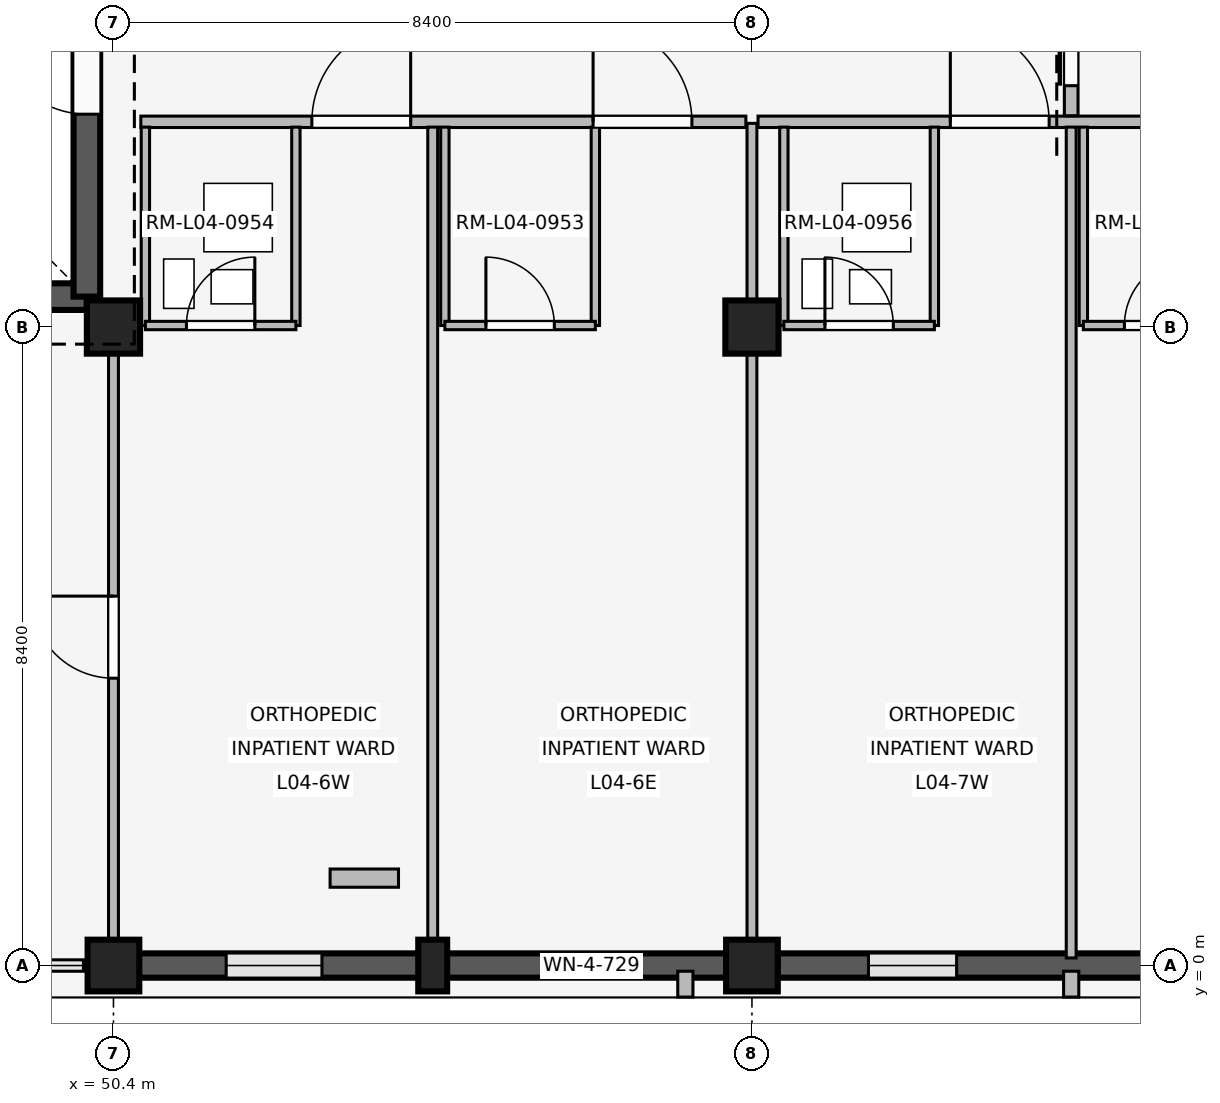
"""IFC4 building model, lengths in metres.
Left out: names, types, materials, properties, quantities, classifications, styles, units other than length and angle.
Written with IfcOpenShell. Run it as: python <this file> out.ifc"""

import sys

from ifc_helpers import new_model, si_unit, direction, frame, frame_2d, origin, origin_2d, place, context, subcontext, project, spatial, rectangle, extrude, element, fill, save


model = new_model("IFC4")
c1 = context("Model", 3, precision=1e-05, world=origin(), true_north=direction((0.0, 1.0)))
c2 = subcontext(c1, "Body", "Model", "MODEL_VIEW")
j1 = project(units=[si_unit("LENGTHUNIT", "METRE"), si_unit("PLANEANGLEUNIT", "RADIAN")], contexts=[c1])
p1 = place(None, origin())
s1 = spatial("IfcSite", under=j1, at=p1, CompositionType="ELEMENT")
p2 = place(p1, origin())
s2 = spatial("IfcBuilding", under=s1, at=p2, CompositionType="ELEMENT")
p3 = place(p2, frame((0.0, 0.0, 16.2)))
s3 = spatial("IfcBuildingStorey", under=s2, at=p3, CompositionType="ELEMENT", Elevation=16.2)
p4 = place(p3, frame((50.4, 0.0, 0.0), z_axis=(0.0, 0.0, 1.0), x_axis=(1.0, 0.0, 0.0)))
e1 = element("IfcColumn", 1, at=p4, inside=s3, PredefinedType="COLUMN", context=c2, shape_type="SweptSolid", body=[
    extrude(rectangle(XDim=0.68, YDim=0.68, at=origin_2d()), origin(), (0.0, 0.0, 1.0), 4.2),
])
p5 = place(p3, frame((50.4, 8.4, 0.0), z_axis=(0.0, 0.0, 1.0), x_axis=(1.0, 0.0, 0.0)))
e2 = element("IfcColumn", 2, at=p5, inside=s3, PredefinedType="COLUMN", context=c2, shape_type="SweptSolid", body=[
    extrude(rectangle(XDim=0.7, YDim=0.7, at=origin_2d()), origin(), (0.0, 0.0, 1.0), 4.2),
])
p6 = place(p3, frame((58.8, 0.0, 0.0), z_axis=(0.0, 0.0, 1.0), x_axis=(1.0, 0.0, 0.0)))
e3 = element("IfcColumn", 3, at=p6, inside=s3, PredefinedType="COLUMN", context=c2, shape_type="SweptSolid", body=[
    extrude(rectangle(XDim=0.68, YDim=0.68, at=origin_2d()), origin(), (0.0, 0.0, 1.0), 4.2),
])
p7 = place(p3, frame((58.8, 8.4, 0.0), z_axis=(0.0, 0.0, 1.0), x_axis=(1.0, 0.0, 0.0)))
e4 = element("IfcColumn", 4, at=p7, inside=s3, PredefinedType="COLUMN", context=c2, shape_type="SweptSolid", body=[
    extrude(rectangle(XDim=0.7, YDim=0.7, at=origin_2d()), origin(), (0.0, 0.0, 1.0), 4.2),
])
p8 = place(p3, frame((54.6, 0.0, 0.0), z_axis=(0.0, 0.0, 1.0), x_axis=(1.0, 0.0, 0.0)))
e5 = element("IfcColumn", 5, at=p8, inside=s3, PredefinedType="PILASTER", context=c2, shape_type="SweptSolid", body=[
    extrude(rectangle(XDim=0.38, YDim=0.68, at=origin_2d()), origin(), (0.0, 0.0, 1.0), 4.2),
])
p9 = place(p3, frame((58.465, 0.0, 0.0), z_axis=(0.0, 0.0, 1.0), x_axis=(-1.0, 0.0, 0.0)))
e6 = element("IfcWall", 6, at=p9, inside=s3, PredefinedType="SOLIDWALL", context=c2, shape_type="SweptSolid", body=[
    extrude(rectangle(XDim=7.73, YDim=0.32, at=frame_2d((3.865, 0.0))), origin(), (0.0, 0.0, 1.0), 3.32),
])
p10 = place(p9, frame((1.148, 0.0, 0.85)))
e7 = element("IfcOpeningElement", 7, at=p10, cuts=e6, PredefinedType="OPENING", context=c2, shape_type="SweptSolid", body=[
    extrude(rectangle(XDim=1.26, YDim=1.52, at=frame_2d((0.63, 0.76))), frame((0.0, 0.17, 0.0), z_axis=(0.0, -1.0, 0.0), x_axis=(1.0, 0.0, 0.0)), (0.0, 0.0, 1.0), 0.34),
])
p11 = place(p9, frame((5.322, 0.0, 0.85)))
e8 = element("IfcOpeningElement", 8, at=p11, cuts=e6, PredefinedType="OPENING", context=c2, shape_type="SweptSolid", body=[
    extrude(rectangle(XDim=1.26, YDim=1.52, at=frame_2d((0.63, 0.76))), frame((0.0, 0.17, 0.0), z_axis=(0.0, -1.0, 0.0), x_axis=(1.0, 0.0, 0.0)), (0.0, 0.0, 1.0), 0.34),
])
p12 = place(p3, frame((57.924, -0.075, 0.0), z_axis=(0.0, 0.0, 1.0), x_axis=(0.0, -1.0, 0.0)))
e9 = element("IfcWall", 9, at=p12, inside=s3, PredefinedType="ELEMENTEDWALL", context=c2, shape_type="SweptSolid", body=[
    extrude(rectangle(XDim=0.34, YDim=0.2, at=frame_2d((0.17, 0.0))), origin(), (0.0, 0.0, 1.0), 3.3),
])
p13 = place(p3, frame((66.865, 0.0, 0.0), z_axis=(0.0, 0.0, 1.0), x_axis=(-1.0, 0.0, 0.0)))
e10 = element("IfcWall", 10, at=p13, inside=s3, PredefinedType="SOLIDWALL", context=c2, shape_type="SweptSolid", body=[
    extrude(rectangle(XDim=7.73, YDim=0.32, at=frame_2d((3.865, 0.0))), origin(), (0.0, 0.0, 1.0), 3.32),
])
p14 = place(p13, frame((1.198, 0.0, 0.85)))
e11 = element("IfcOpeningElement", 11, at=p14, cuts=e10, PredefinedType="OPENING", context=c2, shape_type="SweptSolid", body=[
    extrude(rectangle(XDim=1.16, YDim=1.48, at=frame_2d((0.58, 0.74))), frame((0.0, 0.17, 0.0), z_axis=(0.0, -1.0, 0.0), x_axis=(1.0, 0.0, 0.0)), (0.0, 0.0, 1.0), 0.34),
])
p15 = place(p13, frame((5.372, 0.0, 0.85)))
e12 = element("IfcOpeningElement", 12, at=p15, cuts=e10, PredefinedType="OPENING", context=c2, shape_type="SweptSolid", body=[
    extrude(rectangle(XDim=1.16, YDim=1.48, at=frame_2d((0.58, 0.74))), frame((0.0, 0.17, 0.0), z_axis=(0.0, -1.0, 0.0), x_axis=(1.0, 0.0, 0.0)), (0.0, 0.0, 1.0), 0.34),
])
p16 = place(p3, frame((63.0, -0.075, 0.0), z_axis=(0.0, 0.0, 1.0), x_axis=(0.0, -1.0, 0.0)))
e13 = element("IfcWall", 13, at=p16, inside=s3, PredefinedType="ELEMENTEDWALL", context=c2, shape_type="SweptSolid", body=[
    extrude(rectangle(XDim=0.34, YDim=0.2, at=frame_2d((0.17, 0.0))), origin(), (0.0, 0.0, 1.0), 3.3),
])
p17 = place(p3, frame((42.55, 8.8, 0.0), z_axis=(0.0, 0.0, 1.0), x_axis=(1.0, 0.0, 0.0)))
e14 = element("IfcWall", 14, at=p17, inside=s3, PredefinedType="SHEAR", context=c2, shape_type="SweptSolid", body=[
    extrude(rectangle(XDim=7.5, YDim=0.35, at=frame_2d((3.75, 0.0))), origin(), (0.0, 0.0, 1.0), 3.92),
])
p18 = place(p17, frame((4.85, 0.0, 0.0)))
e15 = element("IfcOpeningElement", 15, at=p18, cuts=e14, PredefinedType="OPENING", context=c2, shape_type="SweptSolid", body=[
    extrude(rectangle(XDim=1.2, YDim=2.2, at=frame_2d((0.6, 1.1))), frame((0.0, 0.185, 0.0), z_axis=(0.0, -1.0, 0.0), x_axis=(1.0, 0.0, 0.0)), (0.0, 0.0, 1.0), 0.37),
])
p19 = place(p3, frame((50.05, 8.8, 0.0), z_axis=(0.0, 0.0, 1.0), x_axis=(0.0, 1.0, 0.0)))
e16 = element("IfcWall", 16, at=p19, inside=s3, PredefinedType="SHEAR", context=c2, shape_type="SweptSolid", body=[
    extrude(rectangle(XDim=7.55, YDim=0.35, at=frame_2d((3.775, 0.0))), origin(), (0.0, 0.0, 1.0), 3.92),
])
p20 = place(p19, frame((2.4, 0.0, 0.0)))
e17 = element("IfcOpeningElement", 17, at=p20, cuts=e16, PredefinedType="OPENING", context=c2, shape_type="SweptSolid", body=[
    extrude(rectangle(XDim=1.2, YDim=2.2, at=frame_2d((0.6, 1.1))), frame((0.0, 0.185, 0.0), z_axis=(0.0, -1.0, 0.0), x_axis=(1.0, 0.0, 0.0)), (0.0, 0.0, 1.0), 0.37),
])
p21 = place(p3, frame((50.4, 0.14, 0.0), z_axis=(0.0, 0.0, 1.0), x_axis=(0.0, 1.0, 0.0)))
e18 = element("IfcWall", 18, at=p21, inside=s3, PredefinedType="PARTITIONING", context=c2, shape_type="SweptSolid", body=[
    extrude(rectangle(XDim=8.21, YDim=0.13, at=frame_2d((4.105, 0.0))), origin(), (0.0, 0.0, 1.0), 3.3),
])
p22 = place(p21, frame((3.64, 0.0, 0.0)))
e19 = element("IfcOpeningElement", 19, at=p22, cuts=e18, PredefinedType="OPENING", context=c2, shape_type="SweptSolid", body=[
    extrude(rectangle(XDim=1.08, YDim=2.15, at=frame_2d((0.54, 1.075))), frame((0.0, 0.075, 0.0), z_axis=(0.0, -1.0, 0.0), x_axis=(1.0, 0.0, 0.0)), (0.0, 0.0, 1.0), 0.15),
])
p23 = place(p3, frame((50.76, 11.1, 0.0), z_axis=(0.0, 0.0, 1.0), x_axis=(1.0, 0.0, 0.0)))
e20 = element("IfcWall", 20, at=p23, inside=s3, PredefinedType="PARTITIONING", context=c2, shape_type="SweptSolid", body=[
    extrude(rectangle(XDim=7.96, YDim=0.15, at=frame_2d((3.98, 0.0))), origin(), (0.0, 0.0, 1.0), 3.3),
])
p24 = place(p23, frame((2.25, 0.0, 0.0)))
e21 = element("IfcOpeningElement", 21, at=p24, cuts=e20, PredefinedType="OPENING", context=c2, shape_type="SweptSolid", body=[
    extrude(rectangle(XDim=1.3, YDim=2.25, at=frame_2d((0.65, 1.125))), frame((0.0, 0.085, 0.0), z_axis=(0.0, -1.0, 0.0), x_axis=(1.0, 0.0, 0.0)), (0.0, 0.0, 1.0), 0.17),
])
p25 = place(p23, frame((5.95, 0.0, 0.0)))
e22 = element("IfcOpeningElement", 22, at=p25, cuts=e20, PredefinedType="OPENING", context=c2, shape_type="SweptSolid", body=[
    extrude(rectangle(XDim=1.3, YDim=2.25, at=frame_2d((0.65, 1.125))), frame((0.0, 0.085, 0.0), z_axis=(0.0, -1.0, 0.0), x_axis=(1.0, 0.0, 0.0)), (0.0, 0.0, 1.0), 0.17),
])
p26 = place(p3, frame((54.6, 0.1, 0.0), z_axis=(0.0, 0.0, 1.0), x_axis=(0.0, 1.0, 0.0)))
e23 = element("IfcWall", 23, at=p26, inside=s3, PredefinedType="PARTITIONING", context=c2, shape_type="SweptSolid", body=[
    extrude(rectangle(XDim=10.93, YDim=0.13, at=frame_2d((5.465, 0.0))), origin(), (0.0, 0.0, 1.0), 3.3),
])
for number, where, z_axis, x_axis in (
    (24, (50.82, 8.42, 0.0), (0.0, 0.0, 1.0), (0.0, 1.0, 0.0)),
    (25, (52.8, 8.42, 0.0), (0.0, 0.0, 1.0), (0.0, 1.0, 0.0)),
):
    element("IfcWall", number, at=place(p3, frame(where, z_axis=z_axis, x_axis=x_axis)), inside=s3, PredefinedType="PARTITIONING", context=c2, shape_type="SweptSolid", body=[
        extrude(rectangle(XDim=2.61, YDim=0.11, at=frame_2d((1.305, 0.0))), origin(), (0.0, 0.0, 1.0), 3.3),
    ])
p27 = place(p3, frame((50.82, 8.42, 0.0), z_axis=(0.0, 0.0, 1.0), x_axis=(1.0, 0.0, 0.0)))
e26 = element("IfcWall", 26, at=p27, inside=s3, PredefinedType="PARTITIONING", context=c2, shape_type="SweptSolid", body=[
    extrude(rectangle(XDim=1.98, YDim=0.11, at=frame_2d((0.99, 0.0))), origin(), (0.0, 0.0, 1.0), 3.3),
])
p28 = place(p27, frame((0.54, 0.0, 0.0)))
e27 = element("IfcOpeningElement", 27, at=p28, cuts=e26, PredefinedType="OPENING", context=c2, shape_type="SweptSolid", body=[
    extrude(rectangle(XDim=0.9, YDim=2.1, at=frame_2d((0.45, 1.05))), frame((0.0, 0.065, 0.0), z_axis=(0.0, -1.0, 0.0), x_axis=(1.0, 0.0, 0.0)), (0.0, 0.0, 1.0), 0.13),
])
for number, where, z_axis, x_axis in (
    (28, (54.76, 8.42, 0.0), (0.0, 0.0, 1.0), (0.0, 1.0, 0.0)),
    (29, (56.74, 8.42, 0.0), (0.0, 0.0, 1.0), (0.0, 1.0, 0.0)),
):
    element("IfcWall", number, at=place(p3, frame(where, z_axis=z_axis, x_axis=x_axis)), inside=s3, PredefinedType="PARTITIONING", context=c2, shape_type="SweptSolid", body=[
        extrude(rectangle(XDim=2.61, YDim=0.11, at=frame_2d((1.305, 0.0))), origin(), (0.0, 0.0, 1.0), 3.3),
    ])
p29 = place(p3, frame((54.76, 8.42, 0.0), z_axis=(0.0, 0.0, 1.0), x_axis=(1.0, 0.0, 0.0)))
e30 = element("IfcWall", 30, at=p29, inside=s3, PredefinedType="PARTITIONING", context=c2, shape_type="SweptSolid", body=[
    extrude(rectangle(XDim=1.98, YDim=0.11, at=frame_2d((0.99, 0.0))), origin(), (0.0, 0.0, 1.0), 3.3),
])
p30 = place(p29, frame((0.54, 0.0, 0.0)))
e31 = element("IfcOpeningElement", 31, at=p30, cuts=e30, PredefinedType="OPENING", context=c2, shape_type="SweptSolid", body=[
    extrude(rectangle(XDim=0.9, YDim=2.1, at=frame_2d((0.45, 1.05))), frame((0.0, 0.065, 0.0), z_axis=(0.0, -1.0, 0.0), x_axis=(1.0, 0.0, 0.0)), (0.0, 0.0, 1.0), 0.13),
])
p31 = place(p3, frame((53.25, 1.15, 0.0), z_axis=(0.0, 0.0, 1.0), x_axis=(1.0, 0.0, 0.0)))
e32 = element("IfcWall", 32, at=p31, inside=s3, PredefinedType="PLUMBINGWALL", context=c2, shape_type="SweptSolid", body=[
    extrude(rectangle(XDim=0.9, YDim=0.24, at=frame_2d((0.45, 0.0))), origin(), (0.0, 0.0, 1.0), 3.3),
])
p32 = place(p3, frame((58.8, 0.14, 0.0), z_axis=(0.0, 0.0, 1.0), x_axis=(0.0, 1.0, 0.0)))
e33 = element("IfcWall", 33, at=p32, inside=s3, PredefinedType="PARTITIONING", context=c2, shape_type="SweptSolid", body=[
    extrude(rectangle(XDim=10.94, YDim=0.13, at=frame_2d((5.47, 0.0))), origin(), (0.0, 0.0, 1.0), 3.3),
])
p33 = place(p3, frame((58.88, 11.1, 0.0), z_axis=(0.0, 0.0, 1.0), x_axis=(1.0, 0.0, 0.0)))
e34 = element("IfcWall", 34, at=p33, inside=s3, PredefinedType="PARTITIONING", context=c2, shape_type="SweptSolid", body=[
    extrude(rectangle(XDim=8.24, YDim=0.15, at=frame_2d((4.12, 0.0))), origin(), (0.0, 0.0, 1.0), 3.3),
])
p34 = place(p33, frame((2.53, 0.0, 0.0)))
e35 = element("IfcOpeningElement", 35, at=p34, cuts=e34, PredefinedType="OPENING", context=c2, shape_type="SweptSolid", body=[
    extrude(rectangle(XDim=1.3, YDim=2.25, at=frame_2d((0.65, 1.125))), frame((0.0, 0.085, 0.0), z_axis=(0.0, -1.0, 0.0), x_axis=(1.0, 0.0, 0.0)), (0.0, 0.0, 1.0), 0.17),
])
p35 = place(p33, frame((6.23, 0.0, 0.0)))
e36 = element("IfcOpeningElement", 36, at=p35, cuts=e34, PredefinedType="OPENING", context=c2, shape_type="SweptSolid", body=[
    extrude(rectangle(XDim=1.3, YDim=2.25, at=frame_2d((0.65, 1.125))), frame((0.0, 0.085, 0.0), z_axis=(0.0, -1.0, 0.0), x_axis=(1.0, 0.0, 0.0)), (0.0, 0.0, 1.0), 0.17),
])
p36 = place(p3, frame((63.0, 0.1, 0.0), z_axis=(0.0, 0.0, 1.0), x_axis=(0.0, 1.0, 0.0)))
e37 = element("IfcWall", 37, at=p36, inside=s3, PredefinedType="PARTITIONING", context=c2, shape_type="SweptSolid", body=[
    extrude(rectangle(XDim=10.93, YDim=0.13, at=frame_2d((5.465, 0.0))), origin(), (0.0, 0.0, 1.0), 3.3),
])
for number, where, z_axis, x_axis in (
    (38, (59.22, 8.42, 0.0), (0.0, 0.0, 1.0), (0.0, 1.0, 0.0)),
    (39, (61.2, 8.42, 0.0), (0.0, 0.0, 1.0), (0.0, 1.0, 0.0)),
):
    element("IfcWall", number, at=place(p3, frame(where, z_axis=z_axis, x_axis=x_axis)), inside=s3, PredefinedType="PARTITIONING", context=c2, shape_type="SweptSolid", body=[
        extrude(rectangle(XDim=2.61, YDim=0.11, at=frame_2d((1.305, 0.0))), origin(), (0.0, 0.0, 1.0), 3.3),
    ])
p37 = place(p3, frame((59.22, 8.42, 0.0), z_axis=(0.0, 0.0, 1.0), x_axis=(1.0, 0.0, 0.0)))
e40 = element("IfcWall", 40, at=p37, inside=s3, PredefinedType="PARTITIONING", context=c2, shape_type="SweptSolid", body=[
    extrude(rectangle(XDim=1.98, YDim=0.11, at=frame_2d((0.99, 0.0))), origin(), (0.0, 0.0, 1.0), 3.3),
])
p38 = place(p37, frame((0.54, 0.0, 0.0)))
e41 = element("IfcOpeningElement", 41, at=p38, cuts=e40, PredefinedType="OPENING", context=c2, shape_type="SweptSolid", body=[
    extrude(rectangle(XDim=0.9, YDim=2.1, at=frame_2d((0.45, 1.05))), frame((0.0, 0.065, 0.0), z_axis=(0.0, -1.0, 0.0), x_axis=(1.0, 0.0, 0.0)), (0.0, 0.0, 1.0), 0.13),
])
p39 = place(p3, frame((63.16, 8.42, 0.0), z_axis=(0.0, 0.0, 1.0), x_axis=(0.0, 1.0, 0.0)))
e42 = element("IfcWall", 42, at=p39, inside=s3, PredefinedType="PARTITIONING", context=c2, shape_type="SweptSolid", body=[
    extrude(rectangle(XDim=2.61, YDim=0.11, at=frame_2d((1.305, 0.0))), origin(), (0.0, 0.0, 1.0), 3.3),
])
p40 = place(p3, frame((63.16, 8.42, 0.0), z_axis=(0.0, 0.0, 1.0), x_axis=(1.0, 0.0, 0.0)))
e43 = element("IfcWall", 43, at=p40, inside=s3, PredefinedType="PARTITIONING", context=c2, shape_type="SweptSolid", body=[
    extrude(rectangle(XDim=1.98, YDim=0.11, at=frame_2d((0.99, 0.0))), origin(), (0.0, 0.0, 1.0), 3.3),
])
p41 = place(p40, frame((0.54, 0.0, 0.0)))
e44 = element("IfcOpeningElement", 44, at=p41, cuts=e43, PredefinedType="OPENING", context=c2, shape_type="SweptSolid", body=[
    extrude(rectangle(XDim=0.9, YDim=2.1, at=frame_2d((0.45, 1.05))), frame((0.0, 0.065, 0.0), z_axis=(0.0, -1.0, 0.0), x_axis=(1.0, 0.0, 0.0)), (0.0, 0.0, 1.0), 0.13),
])
p42 = place(p3, frame((63.0, 11.18, 0.0), z_axis=(0.0, 0.0, 1.0), x_axis=(0.0, 1.0, 0.0)))
e45 = element("IfcWall", 45, at=p42, inside=s3, PredefinedType="PARTITIONING", context=c2, shape_type="SweptSolid", body=[
    extrude(rectangle(XDim=2.84, YDim=0.18, at=frame_2d((1.42, 0.0))), origin(), (0.0, 0.0, 1.0), 3.3),
])
p43 = place(p42, frame((0.395, 0.0, 0.0)))
e46 = element("IfcOpeningElement", 46, at=p43, cuts=e45, PredefinedType="OPENING", context=c2, shape_type="SweptSolid", body=[
    extrude(rectangle(XDim=2.05, YDim=2.35, at=frame_2d((1.025, 1.175))), frame((0.0, 0.1, 0.0), z_axis=(0.0, -1.0, 0.0), x_axis=(1.0, 0.0, 0.0)), (0.0, 0.0, 1.0), 0.2),
])
p44 = place(p10, origin())
e47 = element("IfcWindow", 47, at=p44, inside=s3, PartitioningType="SINGLE_PANEL", PredefinedType="WINDOW", context=c2, shape_type="SweptSolid", body=[
    extrude(rectangle(XDim=1.26, YDim=1.52, at=frame_2d((0.63, 0.76))), frame((0.0, 0.03, 0.0), z_axis=(0.0, -1.0, 0.0), x_axis=(1.0, 0.0, 0.0)), (0.0, 0.0, 1.0), 0.06),
])
fill(e7, e47)
p45 = place(p11, origin())
e48 = element("IfcWindow", 48, at=p45, inside=s3, PartitioningType="SINGLE_PANEL", PredefinedType="WINDOW", context=c2, shape_type="SweptSolid", body=[
    extrude(rectangle(XDim=1.26, YDim=1.52, at=frame_2d((0.63, 0.76))), frame((0.0, 0.03, 0.0), z_axis=(0.0, -1.0, 0.0), x_axis=(1.0, 0.0, 0.0)), (0.0, 0.0, 1.0), 0.06),
])
fill(e8, e48)
p46 = place(p15, origin())
e49 = element("IfcWindow", 49, at=p46, inside=s3, PartitioningType="SINGLE_PANEL", PredefinedType="WINDOW", context=c2, shape_type="SweptSolid", body=[
    extrude(rectangle(XDim=1.16, YDim=1.48, at=frame_2d((0.58, 0.74))), frame((0.0, 0.03, 0.0), z_axis=(0.0, -1.0, 0.0), x_axis=(1.0, 0.0, 0.0)), (0.0, 0.0, 1.0), 0.06),
])
fill(e12, e49)
p47 = place(p20, origin())
e50 = element("IfcDoor", 50, at=p47, inside=s3, OperationType="SINGLE_SWING_RIGHT", PredefinedType="DOOR", context=c2, shape_type="SweptSolid", body=[
    extrude(rectangle(XDim=1.2, YDim=2.2, at=frame_2d((0.6, 1.1))), frame((0.0, 0.025, 0.0), z_axis=(0.0, -1.0, 0.0), x_axis=(1.0, 0.0, 0.0)), (0.0, 0.0, 1.0), 0.05),
])
fill(e17, e50)
p48 = place(p22, origin())
e51 = element("IfcDoor", 51, at=p48, inside=s3, OperationType="SINGLE_SWING_RIGHT", PredefinedType="DOOR", context=c2, shape_type="SweptSolid", body=[
    extrude(rectangle(XDim=1.08, YDim=2.15, at=frame_2d((0.54, 1.075))), frame((0.0, 0.025, 0.0), z_axis=(0.0, -1.0, 0.0), x_axis=(1.0, 0.0, 0.0)), (0.0, 0.0, 1.0), 0.05),
])
fill(e19, e51)
p49 = place(p24, origin())
e52 = element("IfcDoor", 52, at=p49, inside=s3, OperationType="SINGLE_SWING_RIGHT", PredefinedType="DOOR", context=c2, shape_type="SweptSolid", body=[
    extrude(rectangle(XDim=1.3, YDim=2.25, at=frame_2d((0.65, 1.125))), frame((0.0, 0.025, 0.0), z_axis=(0.0, -1.0, 0.0), x_axis=(1.0, 0.0, 0.0)), (0.0, 0.0, 1.0), 0.05),
])
fill(e21, e52)
p50 = place(p25, origin())
e53 = element("IfcDoor", 53, at=p50, inside=s3, OperationType="SINGLE_SWING_LEFT", PredefinedType="DOOR", context=c2, shape_type="SweptSolid", body=[
    extrude(rectangle(XDim=1.3, YDim=2.25, at=frame_2d((0.65, 1.125))), frame((0.0, 0.025, 0.0), z_axis=(0.0, -1.0, 0.0), x_axis=(1.0, 0.0, 0.0)), (0.0, 0.0, 1.0), 0.05),
])
fill(e22, e53)
p51 = place(p28, origin())
e54 = element("IfcDoor", 54, at=p51, inside=s3, OperationType="SINGLE_SWING_RIGHT", PredefinedType="DOOR", context=c2, shape_type="SweptSolid", body=[
    extrude(rectangle(XDim=0.9, YDim=2.1, at=frame_2d((0.45, 1.05))), frame((0.0, 0.025, 0.0), z_axis=(0.0, -1.0, 0.0), x_axis=(1.0, 0.0, 0.0)), (0.0, 0.0, 1.0), 0.05),
])
fill(e27, e54)
p52 = place(p30, origin())
e55 = element("IfcDoor", 55, at=p52, inside=s3, OperationType="SINGLE_SWING_LEFT", PredefinedType="DOOR", context=c2, shape_type="SweptSolid", body=[
    extrude(rectangle(XDim=0.9, YDim=2.1, at=frame_2d((0.45, 1.05))), frame((0.0, 0.025, 0.0), z_axis=(0.0, -1.0, 0.0), x_axis=(1.0, 0.0, 0.0)), (0.0, 0.0, 1.0), 0.05),
])
fill(e31, e55)
p53 = place(p34, origin())
e56 = element("IfcDoor", 56, at=p53, inside=s3, OperationType="SINGLE_SWING_LEFT", PredefinedType="DOOR", context=c2, shape_type="SweptSolid", body=[
    extrude(rectangle(XDim=1.3, YDim=2.25, at=frame_2d((0.65, 1.125))), frame((0.0, 0.025, 0.0), z_axis=(0.0, -1.0, 0.0), x_axis=(1.0, 0.0, 0.0)), (0.0, 0.0, 1.0), 0.05),
])
fill(e35, e56)
p54 = place(p38, origin())
e57 = element("IfcDoor", 57, at=p54, inside=s3, OperationType="SINGLE_SWING_LEFT", PredefinedType="DOOR", context=c2, shape_type="SweptSolid", body=[
    extrude(rectangle(XDim=0.9, YDim=2.1, at=frame_2d((0.45, 1.05))), frame((0.0, 0.025, 0.0), z_axis=(0.0, -1.0, 0.0), x_axis=(1.0, 0.0, 0.0)), (0.0, 0.0, 1.0), 0.05),
])
fill(e41, e57)
p55 = place(p41, origin())
e58 = element("IfcDoor", 58, at=p55, inside=s3, OperationType="SINGLE_SWING_RIGHT", PredefinedType="DOOR", context=c2, shape_type="SweptSolid", body=[
    extrude(rectangle(XDim=0.9, YDim=2.1, at=frame_2d((0.45, 1.05))), frame((0.0, 0.025, 0.0), z_axis=(0.0, -1.0, 0.0), x_axis=(1.0, 0.0, 0.0)), (0.0, 0.0, 1.0), 0.05),
])
fill(e44, e58)
p56 = place(p43, origin())
e59 = element("IfcDoor", 59, at=p56, inside=s3, OperationType="SLIDING_TO_LEFT", PredefinedType="DOOR", context=c2, shape_type="SweptSolid", body=[
    extrude(rectangle(XDim=2.05, YDim=2.35, at=frame_2d((1.025, 1.175))), frame((0.0, 0.025, 0.0), z_axis=(0.0, -1.0, 0.0), x_axis=(1.0, 0.0, 0.0)), (0.0, 0.0, 1.0), 0.05),
])
fill(e46, e59)
save(model, sys.argv[1])
